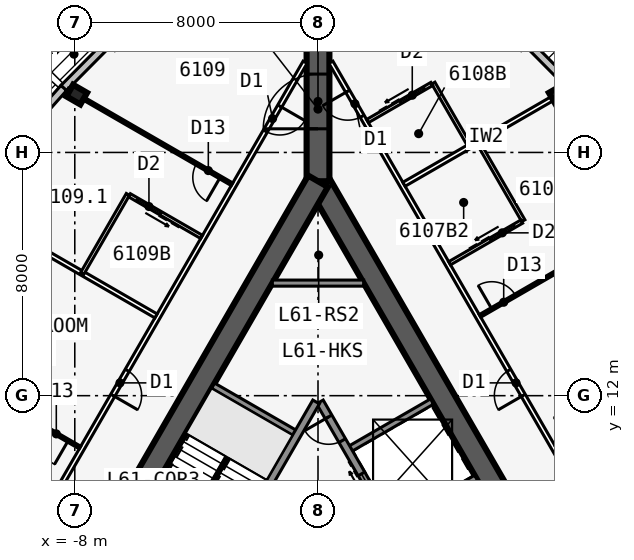
"""IFC4 building model, lengths in metres.
Left out: names, types, materials, properties, quantities, classifications, styles, units other than length and angle.
Written with IfcOpenShell. Run it as: python <this file> out.ifc"""

import sys

from ifc_helpers import new_model, si_unit, direction, frame, frame_2d, origin, origin_2d, place, context, subcontext, project, spatial, rectangle, i_section, extrude, element, fill, save


model = new_model("IFC4")
c1 = context("Model", 3, precision=1e-05, world=origin(), true_north=direction((0.0, 1.0)))
c2 = subcontext(c1, "Body", "Model", "MODEL_VIEW")
j1 = project(units=[si_unit("LENGTHUNIT", "METRE"), si_unit("PLANEANGLEUNIT", "RADIAN")], contexts=[c1])
p1 = place(None, origin())
s1 = spatial("IfcSite", under=j1, at=p1, CompositionType="ELEMENT")
p2 = place(p1, origin())
s2 = spatial("IfcBuilding", under=s1, at=p2, CompositionType="ELEMENT")
p3 = place(p2, frame((0.0, 0.0, 229.7)))
s3 = spatial("IfcBuildingStorey", under=s2, at=p3, CompositionType="ELEMENT", Elevation=229.7)
p4 = place(p3, frame((16.5, -9.526, 0.0), z_axis=(0.0, 0.0, 1.0), x_axis=(-0.499999749417, 0.866025548458, 0.0)))
e1 = element("IfcWall", 1, at=p4, inside=s3, PredefinedType="SHEAR", context=c2, shape_type="SweptSolid", body=[
    extrude(rectangle(XDim=33.0, YDim=0.75, at=frame_2d((16.5, 0.0))), origin(), (0.0, 0.0, 1.0), 3.6),
])
p5 = place(p4, frame((14.15, 0.0, 0.0)))
e2 = element("IfcOpeningElement", 2, at=p5, cuts=e1, PredefinedType="OPENING", context=c2, shape_type="SweptSolid", body=[
    extrude(rectangle(XDim=1.8, YDim=2.13, at=frame_2d((0.9, 1.065))), frame((0.0, 0.385, 0.0), z_axis=(0.0, -1.0, 0.0), x_axis=(1.0, 0.0, 0.0)), (0.0, 0.0, 1.0), 0.77),
])
p6 = place(p4, frame((12.6, 0.0, 0.0)))
e3 = element("IfcOpeningElement", 3, at=p6, cuts=e1, PredefinedType="OPENING", context=c2, shape_type="SweptSolid", body=[
    extrude(rectangle(XDim=1.0, YDim=2.13, at=frame_2d((0.5, 1.065))), frame((0.0, 0.385, 0.0), z_axis=(0.0, -1.0, 0.0), x_axis=(1.0, 0.0, 0.0)), (0.0, 0.0, 1.0), 0.77),
])
p7 = place(p3, frame((5.379, 2.586, 0.0), z_axis=(0.0, 0.0, 1.0), x_axis=(-0.500001375892, 0.866024609411, 0.0)))
e4 = element("IfcWall", 4, at=p7, inside=s3, PredefinedType="SOLIDWALL", context=c2, shape_type="SweptSolid", body=[
    extrude(rectangle(XDim=10.633, YDim=0.25, at=frame_2d((5.316, 0.0))), origin(), (0.0, 0.0, 1.0), 3.35),
])
p8 = place(p7, frame((9.164, 0.0, 0.0)))
e5 = element("IfcOpeningElement", 5, at=p8, cuts=e4, PredefinedType="OPENING", context=c2, shape_type="SweptSolid", body=[
    extrude(rectangle(XDim=0.9, YDim=2.13, at=frame_2d((0.45, 1.065))), frame((0.0, 0.135, 0.0), z_axis=(0.0, -1.0, 0.0), x_axis=(1.0, 0.0, 0.0)), (0.0, 0.0, 1.0), 0.27),
])
p9 = place(p7, frame((1.0, 0.0, 0.0)))
e6 = element("IfcOpeningElement", 6, at=p9, cuts=e4, PredefinedType="OPENING", context=c2, shape_type="SweptSolid", body=[
    extrude(rectangle(XDim=1.1, YDim=2.13, at=frame_2d((0.55, 1.065))), frame((0.0, 0.135, 0.0), z_axis=(0.0, -1.0, 0.0), x_axis=(1.0, 0.0, 0.0)), (0.0, 0.0, 1.0), 0.27),
])
p10 = place(p7, frame((3.9, 0.0, 0.0)))
e7 = element("IfcOpeningElement", 7, at=p10, cuts=e4, PredefinedType="OPENING", context=c2, shape_type="SweptSolid", body=[
    extrude(rectangle(XDim=1.1, YDim=2.13, at=frame_2d((0.55, 1.065))), frame((0.0, 0.135, 0.0), z_axis=(0.0, -1.0, 0.0), x_axis=(1.0, 0.0, 0.0)), (0.0, 0.0, 1.0), 0.27),
])
p11 = place(p7, frame((6.8, 0.0, 0.0)))
e8 = element("IfcOpeningElement", 8, at=p11, cuts=e4, PredefinedType="OPENING", context=c2, shape_type="SweptSolid", body=[
    extrude(rectangle(XDim=1.1, YDim=2.13, at=frame_2d((0.55, 1.065))), frame((0.0, 0.135, 0.0), z_axis=(0.0, -1.0, 0.0), x_axis=(1.0, 0.0, 0.0)), (0.0, 0.0, 1.0), 0.27),
])
for number, where, z_axis, x_axis in (
    (9, (2.429, 7.696, 0.0), (0.0, 0.0, 1.0), (0.866, 0.5, 0.0)),
    (10, (0.979, 10.207, 0.0), (0.0, 0.0, 1.0), (0.866, 0.5, 0.0)),
):
    element("IfcWall", number, at=place(p3, frame(where, z_axis=z_axis, x_axis=x_axis)), inside=s3, PredefinedType="SOLIDWALL", context=c2, shape_type="SweptSolid", body=[
        extrude(rectangle(XDim=3.2, YDim=0.2, at=frame_2d((1.6, 0.0))), origin(), (0.0, 0.0, 1.0), 3.35),
    ])
p12 = place(p3, frame((0.0, 19.052, 0.0), z_axis=(0.0, 0.0, 1.0), x_axis=(-0.499999749417, -0.866025548458, 0.0)))
e11 = element("IfcWall", 11, at=p12, inside=s3, PredefinedType="SHEAR", context=c2, shape_type="SweptSolid", body=[
    extrude(rectangle(XDim=33.0, YDim=0.75, at=frame_2d((16.5, 0.0))), origin(), (0.0, 0.0, 1.0), 3.6),
])
p13 = place(p12, frame((14.15, 0.0, 0.0)))
e12 = element("IfcOpeningElement", 12, at=p13, cuts=e11, PredefinedType="OPENING", context=c2, shape_type="SweptSolid", body=[
    extrude(rectangle(XDim=1.8, YDim=2.13, at=frame_2d((0.9, 1.065))), frame((0.0, 0.385, 0.0), z_axis=(0.0, -1.0, 0.0), x_axis=(1.0, 0.0, 0.0)), (0.0, 0.0, 1.0), 0.77),
])
p14 = place(p12, frame((12.6, 0.0, 0.0)))
e13 = element("IfcOpeningElement", 13, at=p14, cuts=e11, PredefinedType="OPENING", context=c2, shape_type="SweptSolid", body=[
    extrude(rectangle(XDim=1.0, YDim=2.13, at=frame_2d((0.5, 1.065))), frame((0.0, 0.385, 0.0), z_axis=(0.0, -1.0, 0.0), x_axis=(1.0, 0.0, 0.0)), (0.0, 0.0, 1.0), 0.77),
])
p15 = place(p3, frame((-0.062, 11.794, 0.0), z_axis=(0.0, 0.0, 1.0), x_axis=(-0.500006680225, -0.86602154692, 0.0)))
e14 = element("IfcWall", 14, at=p15, inside=s3, PredefinedType="SOLIDWALL", context=c2, shape_type="SweptSolid", body=[
    extrude(rectangle(XDim=7.733, YDim=0.25, at=frame_2d((3.866, 0.0))), origin(), (0.0, 0.0, 1.0), 3.35),
])
p16 = place(p3, frame((-0.679, 10.727, 0.0), z_axis=(0.0, 0.0, 1.0), x_axis=(-0.866008981251, 0.500028443584, 0.0)))
e15 = element("IfcWall", 15, at=p16, inside=s3, PredefinedType="SOLIDWALL", context=c2, shape_type="SweptSolid", body=[
    extrude(rectangle(XDim=3.2, YDim=0.2, at=frame_2d((1.6, 0.0))), origin(), (0.0, 0.0, 1.0), 3.35),
])
p17 = place(p3, frame((0.0, 19.052, 0.0), z_axis=(0.0, 0.0, 1.0), x_axis=(0.0, 1.0, 0.0)))
e16 = element("IfcWall", 16, at=p17, inside=s3, PredefinedType="SHEAR", context=c2, shape_type="SweptSolid", body=[
    extrude(rectangle(XDim=4.746, YDim=0.75, at=frame_2d((2.373, 0.0))), origin(), (0.0, 0.0, 1.0), 3.6),
])
p18 = place(p17, frame((1.725, 0.0, 0.0)))
e17 = element("IfcOpeningElement", 17, at=p18, cuts=e16, PredefinedType="OPENING", context=c2, shape_type="SweptSolid", body=[
    extrude(rectangle(XDim=1.8, YDim=2.13, at=frame_2d((0.9, 1.065))), frame((0.0, 0.385, 0.0), z_axis=(0.0, -1.0, 0.0), x_axis=(1.0, 0.0, 0.0)), (0.0, 0.0, 1.0), 0.77),
])
for number, where, z_axis, x_axis in (
    (18, (7.937, 21.903, 0.0), (0.0, 0.0, 1.0), (-0.5, 0.866, 0.0)),
    (19, (-7.937, 21.903, 0.0), (0.0, 0.0, 1.0), (-0.5, -0.866, 0.0)),
):
    element("IfcColumn", number, at=place(p3, frame(where, z_axis=z_axis, x_axis=x_axis)), inside=s3, PredefinedType="COLUMN", context=c2, shape_type="SweptSolid", body=[
        extrude(i_section(OverallWidth=0.442, OverallDepth=0.531, WebThickness=0.066, FlangeThickness=0.106, at=origin_2d()), origin(), (0.0, 0.0, 1.0), 3.6),
    ])
for number, where, z_axis, x_axis in (
    (20, (8.368, 22.115, 0.0), (0.0, 0.0, 1.0), (-0.704, 0.71, 0.0)),
    (21, (-6.911, 23.583, 0.0), (0.0, 0.0, 1.0), (-0.704, -0.71, 0.0)),
):
    element("IfcWall", number, at=place(p3, frame(where, z_axis=z_axis, x_axis=x_axis)), inside=s3, PredefinedType="STANDARD", context=c2, shape_type="SweptSolid", body=[
        extrude(rectangle(XDim=2.069, YDim=0.25, at=frame_2d((1.034, 0.0))), origin(), (0.0, 0.0, 1.0), 3.35),
    ])
p19 = place(p3, frame((-8.363, 22.12, 0.0), z_axis=(0.0, 0.0, 1.0), x_axis=(-0.664348996191, -0.747422511876, 0.0)))
e22 = element("IfcWall", 22, at=p19, inside=s3, PredefinedType="STANDARD", context=c2, shape_type="SweptSolid", body=[
    extrude(rectangle(XDim=5.105, YDim=0.25, at=frame_2d((2.552, 0.0))), origin(), (0.0, 0.0, 1.0), 3.35),
])
p20 = place(p19, frame((0.752, 0.0, 0.45)))
e23 = element("IfcOpeningElement", 23, at=p20, cuts=e22, PredefinedType="OPENING", context=c2, shape_type="SweptSolid", body=[
    extrude(rectangle(XDim=3.6, YDim=2.6, at=frame_2d((1.8, 1.3))), frame((0.0, 0.135, 0.0), z_axis=(0.0, -1.0, 0.0), x_axis=(1.0, 0.0, 0.0)), (0.0, 0.0, 1.0), 0.27),
])
p21 = place(p3, frame((20.102, -11.115, 0.0), z_axis=(0.0, 0.0, 1.0), x_axis=(-0.500000265775, 0.866025250339, 0.0)))
e24 = element("IfcWall", 24, at=p21, inside=s3, PredefinedType="PARTITIONING", context=c2, shape_type="SweptSolid", body=[
    extrude(rectangle(XDim=39.354, YDim=0.15, at=frame_2d((19.677, 0.0))), origin(), (0.0, 0.0, 1.0), 3.35),
])
p22 = place(p21, frame((1.102, 0.0, 0.0)))
e25 = element("IfcOpeningElement", 25, at=p22, cuts=e24, PredefinedType="OPENING", context=c2, shape_type="SweptSolid", body=[
    extrude(rectangle(XDim=0.95, YDim=2.13, at=frame_2d((0.475, 1.065))), frame((0.0, 0.085, 0.0), z_axis=(0.0, -1.0, 0.0), x_axis=(1.0, 0.0, 0.0)), (0.0, 0.0, 1.0), 0.17),
])
p23 = place(p21, frame((11.702, 0.0, 0.0)))
e26 = element("IfcOpeningElement", 26, at=p23, cuts=e24, PredefinedType="OPENING", context=c2, shape_type="SweptSolid", body=[
    extrude(rectangle(XDim=0.95, YDim=2.13, at=frame_2d((0.475, 1.065))), frame((0.0, 0.085, 0.0), z_axis=(0.0, -1.0, 0.0), x_axis=(1.0, 0.0, 0.0)), (0.0, 0.0, 1.0), 0.17),
])
p24 = place(p21, frame((26.702, 0.0, 0.0)))
e27 = element("IfcOpeningElement", 27, at=p24, cuts=e24, PredefinedType="OPENING", context=c2, shape_type="SweptSolid", body=[
    extrude(rectangle(XDim=0.95, YDim=2.13, at=frame_2d((0.475, 1.065))), frame((0.0, 0.085, 0.0), z_axis=(0.0, -1.0, 0.0), x_axis=(1.0, 0.0, 0.0)), (0.0, 0.0, 1.0), 0.17),
])
p25 = place(p21, frame((37.302, 0.0, 0.0)))
e28 = element("IfcOpeningElement", 28, at=p25, cuts=e24, PredefinedType="OPENING", context=c2, shape_type="SweptSolid", body=[
    extrude(rectangle(XDim=0.95, YDim=2.13, at=frame_2d((0.475, 1.065))), frame((0.0, 0.085, 0.0), z_axis=(0.0, -1.0, 0.0), x_axis=(1.0, 0.0, 0.0)), (0.0, 0.0, 1.0), 0.17),
])
p26 = place(p3, frame((5.329, 14.623, 0.0), z_axis=(0.0, 0.0, 1.0), x_axis=(0.866017877653, 0.500013035415, 0.0)))
e29 = element("IfcWall", 29, at=p26, inside=s3, PredefinedType="PARTITIONING", context=c2, shape_type="SweptSolid", body=[
    extrude(rectangle(XDim=7.273, YDim=0.1, at=frame_2d((3.636, 0.0))), origin(), (0.0, 0.0, 1.0), 2.309),
])
p27 = place(p26, frame((0.45, 0.0, 0.0)))
e30 = element("IfcOpeningElement", 30, at=p27, cuts=e29, PredefinedType="OPENING", context=c2, shape_type="SweptSolid", body=[
    extrude(rectangle(XDim=0.9, YDim=2.13, at=frame_2d((0.45, 1.065))), frame((0.0, 0.06, 0.0), z_axis=(0.0, -1.0, 0.0), x_axis=(1.0, 0.0, 0.0)), (0.0, 0.0, 1.0), 0.12),
])
p28 = place(p3, frame((2.829, 18.954, 0.0), z_axis=(0.0, 0.0, 1.0), x_axis=(0.866026604282, 0.499997920671, 0.0)))
e31 = element("IfcWall", 31, at=p28, inside=s3, PredefinedType="PARTITIONING", context=c2, shape_type="SweptSolid", body=[
    extrude(rectangle(XDim=6.24, YDim=0.15, at=frame_2d((3.12, 0.0))), origin(), (0.0, 0.0, 1.0), 2.25),
])
p29 = place(p3, frame((6.753, 17.755, 0.0), z_axis=(0.0, 0.0, 1.0), x_axis=(-0.499990139034, 0.866031096941, 0.0)))
e32 = element("IfcWall", 32, at=p29, inside=s3, PredefinedType="PLUMBINGWALL", context=c2, shape_type="SweptSolid", body=[
    extrude(rectangle(XDim=3.0, YDim=0.12, at=frame_2d((1.5, 0.0))), origin(), (0.0, 0.0, 1.0), 3.35),
])
p30 = place(p3, frame((4.329, 16.355, 0.0), z_axis=(0.0, 0.0, 1.0), x_axis=(0.866035715982, 0.499982138324, 0.0)))
e33 = element("IfcWall", 33, at=p30, inside=s3, PredefinedType="PLUMBINGWALL", context=c2, shape_type="SweptSolid", body=[
    extrude(rectangle(XDim=2.74, YDim=0.12, at=frame_2d((1.37, 0.0))), origin(), (0.0, 0.0, 1.0), 3.35),
])
p31 = place(p30, frame((1.55, 0.0, 0.0)))
e34 = element("IfcOpeningElement", 34, at=p31, cuts=e33, PredefinedType="OPENING", context=c2, shape_type="SweptSolid", body=[
    extrude(rectangle(XDim=0.9, YDim=2.13, at=frame_2d((0.45, 1.065))), frame((0.0, 0.07, 0.0), z_axis=(0.0, -1.0, 0.0), x_axis=(1.0, 0.0, 0.0)), (0.0, 0.0, 1.0), 0.14),
])
p32 = place(p3, frame((4.993, 20.204, 0.0), z_axis=(0.0, 0.0, 1.0), x_axis=(-0.500001309137, 0.866024647952, 0.0)))
e35 = element("IfcWall", 35, at=p32, inside=s3, PredefinedType="PLUMBINGWALL", context=c2, shape_type="SweptSolid", body=[
    extrude(rectangle(XDim=2.4, YDim=0.12, at=frame_2d((1.2, 0.0))), origin(), (0.0, 0.0, 1.0), 3.35),
])
p33 = place(p3, frame((1.628, 21.032, 0.0), z_axis=(0.0, 0.0, 1.0), x_axis=(0.866048967903, 0.499959183527, 0.0)))
e36 = element("IfcWall", 36, at=p33, inside=s3, PredefinedType="PLUMBINGWALL", context=c2, shape_type="SweptSolid", body=[
    extrude(rectangle(XDim=2.44, YDim=0.12, at=frame_2d((1.22, 0.0))), origin(), (0.0, 0.0, 1.0), 3.35),
])
p34 = place(p33, frame((1.25, 0.0, 0.0)))
e37 = element("IfcOpeningElement", 37, at=p34, cuts=e36, PredefinedType="OPENING", context=c2, shape_type="SweptSolid", body=[
    extrude(rectangle(XDim=0.9, YDim=2.13, at=frame_2d((0.45, 1.065))), frame((0.0, 0.07, 0.0), z_axis=(0.0, -1.0, 0.0), x_axis=(1.0, 0.0, 0.0)), (0.0, 0.0, 1.0), 0.14),
])
p35 = place(p3, frame((-0.425, 22.966, 0.0), z_axis=(0.0, 0.0, 1.0), x_axis=(-0.500000265775, -0.866025250339, 0.0)))
e38 = element("IfcWall", 38, at=p35, inside=s3, PredefinedType="PARTITIONING", context=c2, shape_type="SweptSolid", body=[
    extrude(rectangle(XDim=39.354, YDim=0.15, at=frame_2d((19.677, 0.0))), origin(), (0.0, 0.0, 1.0), 3.35),
])
p36 = place(p35, frame((1.665, 0.0, 0.0)))
e39 = element("IfcOpeningElement", 39, at=p36, cuts=e38, PredefinedType="OPENING", context=c2, shape_type="SweptSolid", body=[
    extrude(rectangle(XDim=0.95, YDim=2.13, at=frame_2d((0.475, 1.065))), frame((0.0, 0.085, 0.0), z_axis=(0.0, -1.0, 0.0), x_axis=(1.0, 0.0, 0.0)), (0.0, 0.0, 1.0), 0.17),
])
p37 = place(p35, frame((11.702, 0.0, 0.0)))
e40 = element("IfcOpeningElement", 40, at=p37, cuts=e38, PredefinedType="OPENING", context=c2, shape_type="SweptSolid", body=[
    extrude(rectangle(XDim=0.95, YDim=2.13, at=frame_2d((0.475, 1.065))), frame((0.0, 0.085, 0.0), z_axis=(0.0, -1.0, 0.0), x_axis=(1.0, 0.0, 0.0)), (0.0, 0.0, 1.0), 0.17),
])
p38 = place(p35, frame((21.702, 0.0, 0.0)))
e41 = element("IfcOpeningElement", 41, at=p38, cuts=e38, PredefinedType="OPENING", context=c2, shape_type="SweptSolid", body=[
    extrude(rectangle(XDim=0.95, YDim=2.13, at=frame_2d((0.475, 1.065))), frame((0.0, 0.085, 0.0), z_axis=(0.0, -1.0, 0.0), x_axis=(1.0, 0.0, 0.0)), (0.0, 0.0, 1.0), 0.17),
])
p39 = place(p35, frame((36.739, 0.0, 0.0)))
e42 = element("IfcOpeningElement", 42, at=p39, cuts=e38, PredefinedType="OPENING", context=c2, shape_type="SweptSolid", body=[
    extrude(rectangle(XDim=0.95, YDim=2.13, at=frame_2d((0.475, 1.065))), frame((0.0, 0.085, 0.0), z_axis=(0.0, -1.0, 0.0), x_axis=(1.0, 0.0, 0.0)), (0.0, 0.0, 1.0), 0.17),
])
p40 = place(p3, frame((-2.829, 18.954, 0.0), z_axis=(0.0, 0.0, 1.0), x_axis=(-0.866026604282, 0.499997920671, 0.0)))
e43 = element("IfcWall", 43, at=p40, inside=s3, PredefinedType="PARTITIONING", context=c2, shape_type="SweptSolid", body=[
    extrude(rectangle(XDim=6.24, YDim=0.1, at=frame_2d((3.12, 0.0))), origin(), (0.0, 0.0, 1.0), 2.25),
])
p41 = place(p40, frame((0.45, 0.0, 0.0)))
e44 = element("IfcOpeningElement", 44, at=p41, cuts=e43, PredefinedType="OPENING", context=c2, shape_type="SweptSolid", body=[
    extrude(rectangle(XDim=0.9, YDim=2.13, at=frame_2d((0.45, 1.065))), frame((0.0, 0.06, 0.0), z_axis=(0.0, -1.0, 0.0), x_axis=(1.0, 0.0, 0.0)), (0.0, 0.0, 1.0), 0.12),
])
p42 = place(p3, frame((-5.329, 14.623, 0.0), z_axis=(0.0, 0.0, 1.0), x_axis=(-0.866017877653, 0.500013035415, 0.0)))
e45 = element("IfcWall", 45, at=p42, inside=s3, PredefinedType="PARTITIONING", context=c2, shape_type="SweptSolid", body=[
    extrude(rectangle(XDim=7.273, YDim=0.15, at=frame_2d((3.636, 0.0))), origin(), (0.0, 0.0, 1.0), 2.309),
])
p43 = place(p3, frame((-7.829, 10.293, 0.0), z_axis=(0.0, 0.0, 1.0), x_axis=(-0.866030558329, 0.49999107196, 0.0)))
e46 = element("IfcWall", 46, at=p43, inside=s3, PredefinedType="PARTITIONING", context=c2, shape_type="SweptSolid", body=[
    extrude(rectangle(XDim=7.894, YDim=0.1, at=frame_2d((3.947, 0.0))), origin(), (0.0, 0.0, 1.0), 2.25),
])
p44 = place(p43, frame((0.45, 0.0, 0.0)))
e47 = element("IfcOpeningElement", 47, at=p44, cuts=e46, PredefinedType="OPENING", context=c2, shape_type="SweptSolid", body=[
    extrude(rectangle(XDim=0.9, YDim=2.13, at=frame_2d((0.45, 1.065))), frame((0.0, 0.06, 0.0), z_axis=(0.0, -1.0, 0.0), x_axis=(1.0, 0.0, 0.0)), (0.0, 0.0, 1.0), 0.12),
])
p45 = place(p3, frame((-6.253, 18.622, 0.0), z_axis=(0.0, 0.0, 1.0), x_axis=(-0.499990139034, -0.866031096941, 0.0)))
e48 = element("IfcWall", 48, at=p45, inside=s3, PredefinedType="PLUMBINGWALL", context=c2, shape_type="SweptSolid", body=[
    extrude(rectangle(XDim=3.0, YDim=0.12, at=frame_2d((1.5, 0.0))), origin(), (0.0, 0.0, 1.0), 3.35),
])
p46 = place(p3, frame((-3.829, 17.221, 0.0), z_axis=(0.0, 0.0, 1.0), x_axis=(-0.865997131366, 0.500048966069, 0.0)))
e49 = element("IfcWall", 49, at=p46, inside=s3, PredefinedType="PLUMBINGWALL", context=c2, shape_type="SweptSolid", body=[
    extrude(rectangle(XDim=2.74, YDim=0.12, at=frame_2d((1.37, 0.0))), origin(), (0.0, 0.0, 1.0), 3.35),
])
p47 = place(p46, frame((1.55, 0.0, 0.0)))
e50 = element("IfcOpeningElement", 50, at=p47, cuts=e49, PredefinedType="OPENING", context=c2, shape_type="SweptSolid", body=[
    extrude(rectangle(XDim=0.9, YDim=2.13, at=frame_2d((0.45, 1.065))), frame((0.0, 0.07, 0.0), z_axis=(0.0, -1.0, 0.0), x_axis=(1.0, 0.0, 0.0)), (0.0, 0.0, 1.0), 0.14),
])
p48 = place(p3, frame((-1.501, 15.703, 0.0), z_axis=(0.0, 0.0, 1.0), x_axis=(1.0, 0.0, 0.0)))
e51 = element("IfcWall", 51, at=p48, inside=s3, PredefinedType="SOLIDWALL", context=c2, shape_type="SweptSolid", body=[
    extrude(rectangle(XDim=3.002, YDim=0.2, at=frame_2d((1.501, 0.0))), origin(), (0.0, 0.0, 1.0), 3.35),
])
p49 = place(p3, frame((-2.988, 9.978, 0.0), z_axis=(0.0, 0.0, 1.0), x_axis=(-0.499992232847, -0.866029888106, 0.0)))
e52 = element("IfcWall", 52, at=p49, inside=s3, PredefinedType="SOLIDWALL", context=c2, shape_type="SweptSolid", body=[
    extrude(rectangle(XDim=2.794, YDim=0.1, at=frame_2d((1.397, 0.0))), origin(), (0.0, 0.0, 1.0), 3.6),
])
p50 = place(p27, origin())
e53 = element("IfcDoor", 53, at=p50, inside=s3, OperationType="SINGLE_SWING_LEFT", PredefinedType="DOOR", context=c2, shape_type="SweptSolid", body=[
    extrude(rectangle(XDim=0.9, YDim=2.13, at=frame_2d((0.45, 1.065))), frame((0.0, 0.025, 0.0), z_axis=(0.0, -1.0, 0.0), x_axis=(1.0, 0.0, 0.0)), (0.0, 0.0, 1.0), 0.05),
])
fill(e30, e53)
p51 = place(p24, origin())
e54 = element("IfcDoor", 54, at=p51, inside=s3, OperationType="SINGLE_SWING_LEFT", PredefinedType="DOOR", context=c2, shape_type="SweptSolid", body=[
    extrude(rectangle(XDim=0.95, YDim=2.13, at=frame_2d((0.475, 1.065))), frame((0.0, 0.025, 0.0), z_axis=(0.0, -1.0, 0.0), x_axis=(1.0, 0.0, 0.0)), (0.0, 0.0, 1.0), 0.05),
])
fill(e27, e54)
p52 = place(p31, origin())
e55 = element("IfcDoor", 55, at=p52, inside=s3, OperationType="SLIDING_TO_LEFT", PredefinedType="DOOR", context=c2, shape_type="SweptSolid", body=[
    extrude(rectangle(XDim=0.9, YDim=2.13, at=frame_2d((0.45, 1.065))), frame((0.0, 0.025, 0.0), z_axis=(0.0, -1.0, 0.0), x_axis=(1.0, 0.0, 0.0)), (0.0, 0.0, 1.0), 0.05),
])
fill(e34, e55)
p53 = place(p34, origin())
e56 = element("IfcDoor", 56, at=p53, inside=s3, OperationType="SLIDING_TO_LEFT", PredefinedType="DOOR", context=c2, shape_type="SweptSolid", body=[
    extrude(rectangle(XDim=0.9, YDim=2.13, at=frame_2d((0.45, 1.065))), frame((0.0, 0.025, 0.0), z_axis=(0.0, -1.0, 0.0), x_axis=(1.0, 0.0, 0.0)), (0.0, 0.0, 1.0), 0.05),
])
fill(e37, e56)
p54 = place(p25, origin())
e57 = element("IfcDoor", 57, at=p54, inside=s3, OperationType="SINGLE_SWING_RIGHT", PredefinedType="DOOR", context=c2, shape_type="SweptSolid", body=[
    extrude(rectangle(XDim=0.95, YDim=2.13, at=frame_2d((0.475, 1.065))), frame((0.0, 0.025, 0.0), z_axis=(0.0, -1.0, 0.0), x_axis=(1.0, 0.0, 0.0)), (0.0, 0.0, 1.0), 0.05),
])
fill(e28, e57)
p55 = place(p41, origin())
e58 = element("IfcDoor", 58, at=p55, inside=s3, OperationType="SINGLE_SWING_LEFT", PredefinedType="DOOR", context=c2, shape_type="SweptSolid", body=[
    extrude(rectangle(XDim=0.9, YDim=2.13, at=frame_2d((0.45, 1.065))), frame((0.0, 0.025, 0.0), z_axis=(0.0, -1.0, 0.0), x_axis=(1.0, 0.0, 0.0)), (0.0, 0.0, 1.0), 0.05),
])
fill(e44, e58)
p56 = place(p44, origin())
e59 = element("IfcDoor", 59, at=p56, inside=s3, OperationType="SINGLE_SWING_LEFT", PredefinedType="DOOR", context=c2, shape_type="SweptSolid", body=[
    extrude(rectangle(XDim=0.9, YDim=2.13, at=frame_2d((0.45, 1.065))), frame((0.0, 0.025, 0.0), z_axis=(0.0, -1.0, 0.0), x_axis=(1.0, 0.0, 0.0)), (0.0, 0.0, 1.0), 0.05),
])
fill(e47, e59)
p57 = place(p36, origin())
e60 = element("IfcDoor", 60, at=p57, inside=s3, OperationType="SINGLE_SWING_LEFT", PredefinedType="DOOR", context=c2, shape_type="SweptSolid", body=[
    extrude(rectangle(XDim=0.95, YDim=2.13, at=frame_2d((0.475, 1.065))), frame((0.0, 0.025, 0.0), z_axis=(0.0, -1.0, 0.0), x_axis=(1.0, 0.0, 0.0)), (0.0, 0.0, 1.0), 0.05),
])
fill(e39, e60)
p58 = place(p47, origin())
e61 = element("IfcDoor", 61, at=p58, inside=s3, OperationType="SLIDING_TO_LEFT", PredefinedType="DOOR", context=c2, shape_type="SweptSolid", body=[
    extrude(rectangle(XDim=0.9, YDim=2.13, at=frame_2d((0.45, 1.065))), frame((0.0, 0.025, 0.0), z_axis=(0.0, -1.0, 0.0), x_axis=(1.0, 0.0, 0.0)), (0.0, 0.0, 1.0), 0.05),
])
fill(e50, e61)
p59 = place(p37, origin())
e62 = element("IfcDoor", 62, at=p59, inside=s3, OperationType="SINGLE_SWING_RIGHT", PredefinedType="DOOR", context=c2, shape_type="SweptSolid", body=[
    extrude(rectangle(XDim=0.95, YDim=2.13, at=frame_2d((0.475, 1.065))), frame((0.0, 0.025, 0.0), z_axis=(0.0, -1.0, 0.0), x_axis=(1.0, 0.0, 0.0)), (0.0, 0.0, 1.0), 0.05),
])
fill(e40, e62)
p60 = place(p18, origin())
e63 = element("IfcDoor", 63, at=p60, inside=s3, OperationType="DOUBLE_DOOR_DOUBLE_SWING", PredefinedType="DOOR", context=c2, shape_type="SweptSolid", body=[
    extrude(rectangle(XDim=1.8, YDim=2.13, at=frame_2d((0.9, 1.065))), frame((0.0, 0.025, 0.0), z_axis=(0.0, -1.0, 0.0), x_axis=(1.0, 0.0, 0.0)), (0.0, 0.0, 1.0), 0.05),
])
fill(e17, e63)
p61 = place(p8, origin())
e64 = element("IfcDoor", 64, at=p61, inside=s3, OperationType="SINGLE_SWING_RIGHT", PredefinedType="DOOR", context=c2, shape_type="SweptSolid", body=[
    extrude(rectangle(XDim=0.9, YDim=2.13, at=frame_2d((0.45, 1.065))), frame((0.0, 0.025, 0.0), z_axis=(0.0, -1.0, 0.0), x_axis=(1.0, 0.0, 0.0)), (0.0, 0.0, 1.0), 0.05),
])
fill(e5, e64)
p62 = place(p11, origin())
e65 = element("IfcDoor", 65, at=p62, inside=s3, OperationType="DOUBLE_DOOR_SLIDING", PredefinedType="USERDEFINED", context=c2, shape_type="SweptSolid", body=[
    extrude(rectangle(XDim=1.1, YDim=2.13, at=frame_2d((0.55, 1.065))), frame((0.0, 0.025, 0.0), z_axis=(0.0, -1.0, 0.0), x_axis=(1.0, 0.0, 0.0)), (0.0, 0.0, 1.0), 0.05),
])
fill(e8, e65)
save(model, sys.argv[1])
